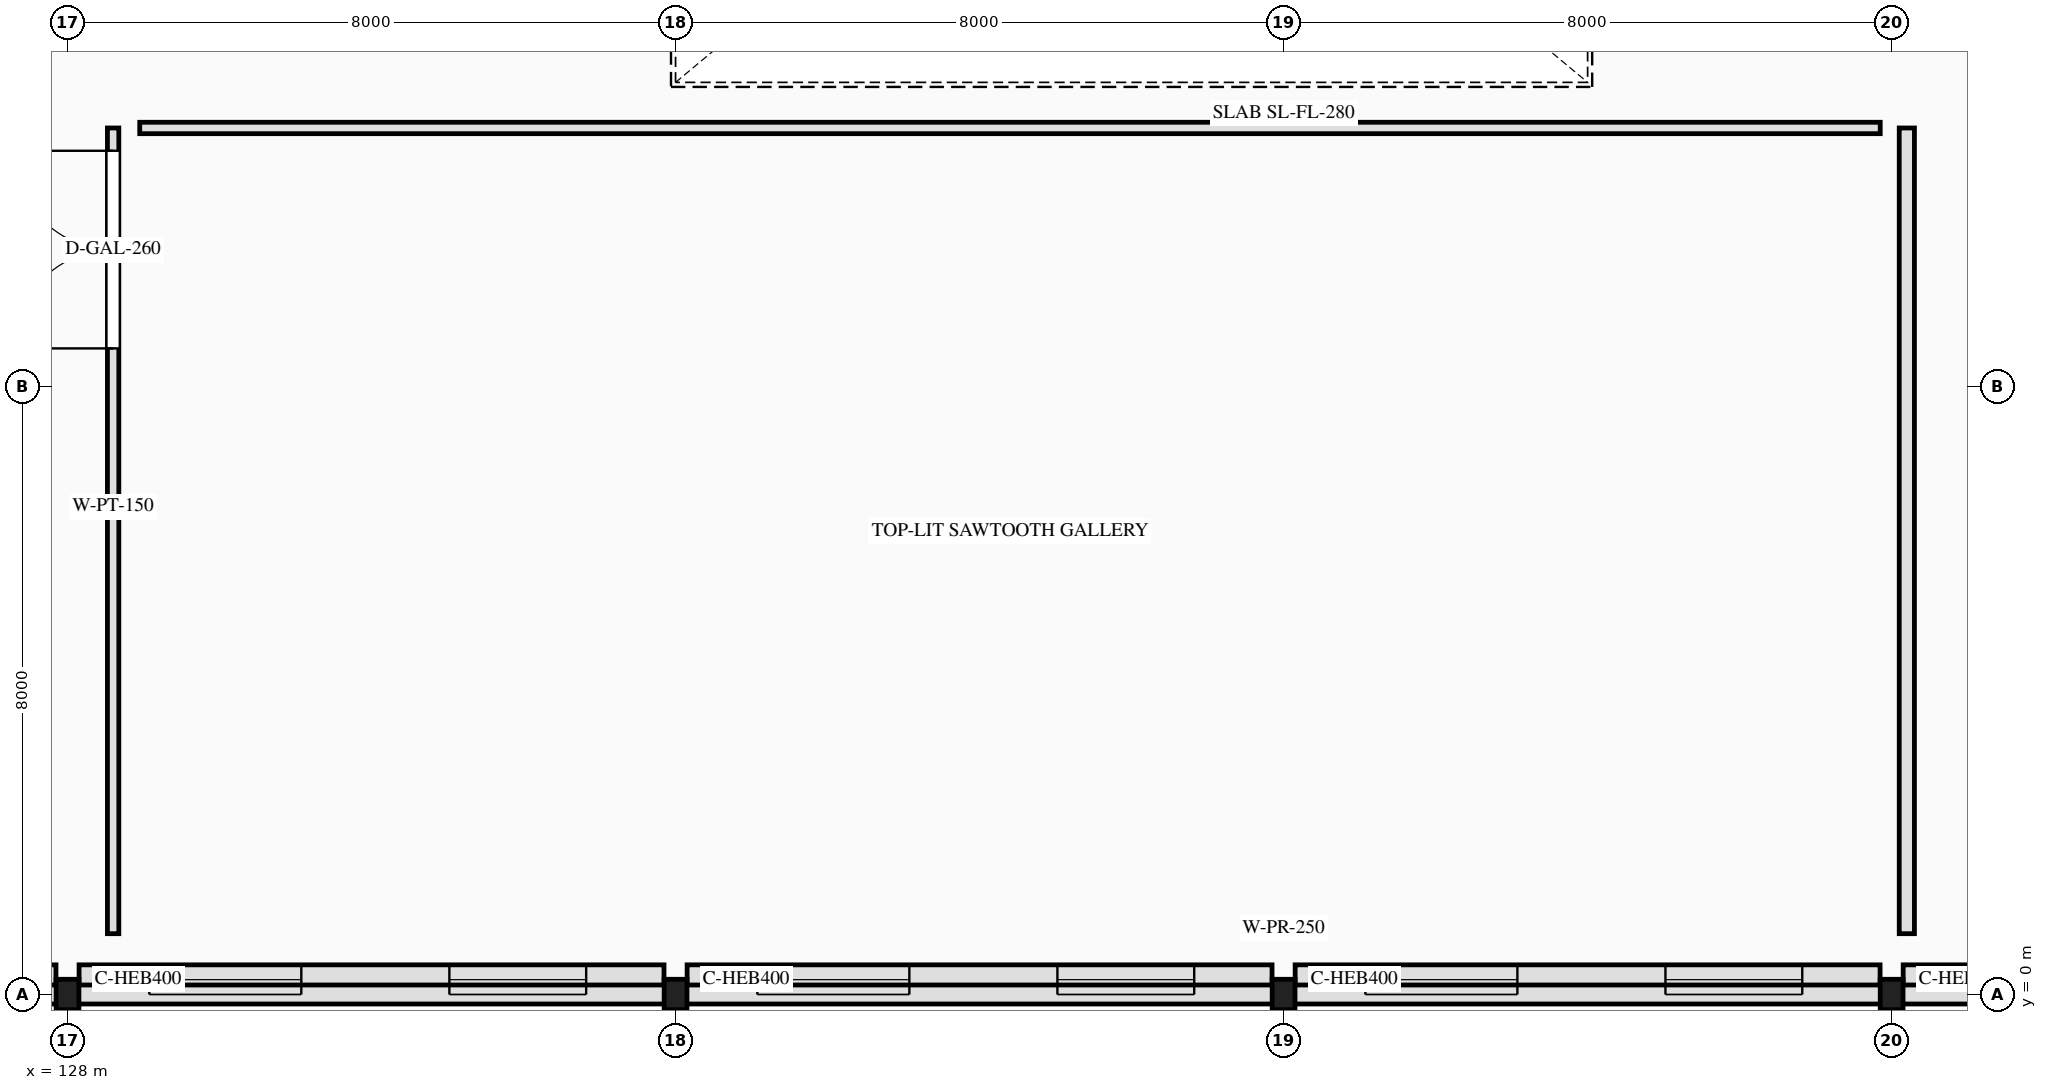
"""IFC4 building model, lengths in metres.
Left out: names, types, materials, properties, quantities, classifications, styles, units other than length and angle.
Written with IfcOpenShell. Run it as: python <this file> out.ifc"""

import sys

from ifc_helpers import new_model, si_unit, direction, frame, frame_2d, origin, origin_2d, place, context, subcontext, project, spatial, rectangle, i_section, extrude, element, fill, save


model = new_model("IFC4")
c1 = context("Model", 3, precision=1e-05, world=origin(), true_north=direction((0.0, 1.0)))
c2 = subcontext(c1, "Body", "Model", "MODEL_VIEW")
j1 = project(units=[si_unit("LENGTHUNIT", "METRE"), si_unit("PLANEANGLEUNIT", "RADIAN")], contexts=[c1])
p1 = place(None, origin())
s1 = spatial("IfcSite", under=j1, at=p1, CompositionType="ELEMENT")
p2 = place(p1, origin())
s2 = spatial("IfcBuilding", under=s1, at=p2, CompositionType="ELEMENT")
p3 = place(p2, frame((0.0, 0.0, 26.0)))
s3 = spatial("IfcBuildingStorey", under=s2, at=p3, CompositionType="ELEMENT", Elevation=26.0)
for number, where, z_axis, x_axis in (
    (1, (128.0, 0.0, 0.0), (0.0, 0.0, 1.0), (1.0, 0.0, 0.0)),
    (2, (136.0, 0.0, 0.0), (0.0, 0.0, 1.0), (1.0, 0.0, 0.0)),
    (3, (144.0, 0.0, 0.0), (0.0, 0.0, 1.0), (1.0, 0.0, 0.0)),
    (4, (152.0, 0.0, 0.0), (0.0, 0.0, 1.0), (1.0, 0.0, 0.0)),
):
    element("IfcColumn", number, at=place(p3, frame(where, z_axis=z_axis, x_axis=x_axis)), inside=s3, PredefinedType="COLUMN", context=c2, shape_type="SweptSolid", body=[
        extrude(i_section(OverallWidth=0.3, OverallDepth=0.4, WebThickness=0.013, FlangeThickness=0.024, FilletRadius=0.027, at=origin_2d()), origin(), (0.0, 0.0, 1.0), 8.0),
    ])
p4 = place(p3, frame((127.848, 0.195, 0.0), z_axis=(0.0, 0.0, 1.0), x_axis=(-1.0, 0.0, 0.0)))
e5 = element("IfcWall", 5, at=p4, inside=s3, PredefinedType="SOLIDWALL", context=c2, shape_type="SweptSolid", body=[
    extrude(rectangle(XDim=7.696, YDim=0.39, at=frame_2d((3.848, 0.0))), origin(), (0.0, 0.0, 1.0), 7.495),
])
p5 = place(p4, frame((1.024, 0.0, 0.85)))
e6 = element("IfcOpeningElement", 6, at=p5, cuts=e5, PredefinedType="OPENING", context=c2, shape_type="SweptSolid", body=[
    extrude(rectangle(XDim=1.8, YDim=4.2, at=frame_2d((0.9, 2.1))), frame((0.0, 0.205, 0.0), z_axis=(0.0, -1.0, 0.0), x_axis=(1.0, 0.0, 0.0)), (0.0, 0.0, 1.0), 0.41),
])
p6 = place(p4, frame((4.772, 0.0, 0.85)))
e7 = element("IfcOpeningElement", 7, at=p6, cuts=e5, PredefinedType="OPENING", context=c2, shape_type="SweptSolid", body=[
    extrude(rectangle(XDim=2.0, YDim=4.6, at=frame_2d((1.0, 2.3))), frame((0.0, 0.205, 0.0), z_axis=(0.0, -1.0, 0.0), x_axis=(1.0, 0.0, 0.0)), (0.0, 0.0, 1.0), 0.41),
])
p7 = place(p3, frame((135.848, 0.195, 0.0), z_axis=(0.0, 0.0, 1.0), x_axis=(-1.0, 0.0, 0.0)))
e8 = element("IfcWall", 8, at=p7, inside=s3, PredefinedType="SOLIDWALL", context=c2, shape_type="SweptSolid", body=[
    extrude(rectangle(XDim=7.696, YDim=0.39, at=frame_2d((3.848, 0.0))), origin(), (0.0, 0.0, 1.0), 7.495),
])
p8 = place(p7, frame((1.024, 0.0, 0.85)))
e9 = element("IfcOpeningElement", 9, at=p8, cuts=e8, PredefinedType="OPENING", context=c2, shape_type="SweptSolid", body=[
    extrude(rectangle(XDim=1.8, YDim=4.2, at=frame_2d((0.9, 2.1))), frame((0.0, 0.205, 0.0), z_axis=(0.0, -1.0, 0.0), x_axis=(1.0, 0.0, 0.0)), (0.0, 0.0, 1.0), 0.41),
])
p9 = place(p7, frame((4.772, 0.0, 0.85)))
e10 = element("IfcOpeningElement", 10, at=p9, cuts=e8, PredefinedType="OPENING", context=c2, shape_type="SweptSolid", body=[
    extrude(rectangle(XDim=2.0, YDim=4.6, at=frame_2d((1.0, 2.3))), frame((0.0, 0.205, 0.0), z_axis=(0.0, -1.0, 0.0), x_axis=(1.0, 0.0, 0.0)), (0.0, 0.0, 1.0), 0.41),
])
p10 = place(p3, frame((143.848, 0.195, 0.0), z_axis=(0.0, 0.0, 1.0), x_axis=(-1.0, 0.0, 0.0)))
e11 = element("IfcWall", 11, at=p10, inside=s3, PredefinedType="SOLIDWALL", context=c2, shape_type="SweptSolid", body=[
    extrude(rectangle(XDim=7.696, YDim=0.39, at=frame_2d((3.848, 0.0))), origin(), (0.0, 0.0, 1.0), 7.495),
])
p11 = place(p10, frame((1.024, 0.0, 0.85)))
e12 = element("IfcOpeningElement", 12, at=p11, cuts=e11, PredefinedType="OPENING", context=c2, shape_type="SweptSolid", body=[
    extrude(rectangle(XDim=1.8, YDim=4.2, at=frame_2d((0.9, 2.1))), frame((0.0, 0.205, 0.0), z_axis=(0.0, -1.0, 0.0), x_axis=(1.0, 0.0, 0.0)), (0.0, 0.0, 1.0), 0.41),
])
p12 = place(p10, frame((4.772, 0.0, 0.85)))
e13 = element("IfcOpeningElement", 13, at=p12, cuts=e11, PredefinedType="OPENING", context=c2, shape_type="SweptSolid", body=[
    extrude(rectangle(XDim=2.0, YDim=4.6, at=frame_2d((1.0, 2.3))), frame((0.0, 0.205, 0.0), z_axis=(0.0, -1.0, 0.0), x_axis=(1.0, 0.0, 0.0)), (0.0, 0.0, 1.0), 0.41),
])
p13 = place(p3, frame((151.848, 0.195, 0.0), z_axis=(0.0, 0.0, 1.0), x_axis=(-1.0, 0.0, 0.0)))
e14 = element("IfcWall", 14, at=p13, inside=s3, PredefinedType="SOLIDWALL", context=c2, shape_type="SweptSolid", body=[
    extrude(rectangle(XDim=7.696, YDim=0.39, at=frame_2d((3.848, 0.0))), origin(), (0.0, 0.0, 1.0), 7.495),
])
p14 = place(p13, frame((1.024, 0.0, 0.85)))
e15 = element("IfcOpeningElement", 15, at=p14, cuts=e14, PredefinedType="OPENING", context=c2, shape_type="SweptSolid", body=[
    extrude(rectangle(XDim=1.8, YDim=4.2, at=frame_2d((0.9, 2.1))), frame((0.0, 0.205, 0.0), z_axis=(0.0, -1.0, 0.0), x_axis=(1.0, 0.0, 0.0)), (0.0, 0.0, 1.0), 0.41),
])
p15 = place(p13, frame((4.772, 0.0, 0.85)))
e16 = element("IfcOpeningElement", 16, at=p15, cuts=e14, PredefinedType="OPENING", context=c2, shape_type="SweptSolid", body=[
    extrude(rectangle(XDim=2.0, YDim=4.6, at=frame_2d((1.0, 2.3))), frame((0.0, 0.205, 0.0), z_axis=(0.0, -1.0, 0.0), x_axis=(1.0, 0.0, 0.0)), (0.0, 0.0, 1.0), 0.41),
])
p16 = place(p3, frame((159.848, 0.195, 0.0), z_axis=(0.0, 0.0, 1.0), x_axis=(-1.0, 0.0, 0.0)))
e17 = element("IfcWall", 17, at=p16, inside=s3, PredefinedType="SOLIDWALL", context=c2, shape_type="SweptSolid", body=[
    extrude(rectangle(XDim=7.696, YDim=0.39, at=frame_2d((3.848, 0.0))), origin(), (0.0, 0.0, 1.0), 7.495),
])
p17 = place(p16, frame((1.024, 0.0, 0.85)))
e18 = element("IfcOpeningElement", 18, at=p17, cuts=e17, PredefinedType="OPENING", context=c2, shape_type="SweptSolid", body=[
    extrude(rectangle(XDim=1.8, YDim=4.2, at=frame_2d((0.9, 2.1))), frame((0.0, 0.205, 0.0), z_axis=(0.0, -1.0, 0.0), x_axis=(1.0, 0.0, 0.0)), (0.0, 0.0, 1.0), 0.41),
])
p18 = place(p16, frame((4.772, 0.0, 0.85)))
e19 = element("IfcOpeningElement", 19, at=p18, cuts=e17, PredefinedType="OPENING", context=c2, shape_type="SweptSolid", body=[
    extrude(rectangle(XDim=2.0, YDim=4.6, at=frame_2d((1.0, 2.3))), frame((0.0, 0.205, 0.0), z_axis=(0.0, -1.0, 0.0), x_axis=(1.0, 0.0, 0.0)), (0.0, 0.0, 1.0), 0.41),
])
p19 = place(p3, frame((120.2, 0.0, 8.0), z_axis=(0.0, 0.0, 1.0), x_axis=(1.0, 0.0, 0.0)))
e20 = element("IfcWall", 20, at=p19, inside=s3, PredefinedType="PARAPET", context=c2, shape_type="SweptSolid", body=[
    extrude(rectangle(XDim=47.6, YDim=0.25, at=frame_2d((23.8, 0.0))), origin(), (0.0, 0.0, 1.0), 0.55),
])
p20 = place(p3, frame((128.6, 0.8, 0.0), z_axis=(0.0, 0.0, 1.0), x_axis=(0.0, 1.0, 0.0)))
e21 = element("IfcWall", 21, at=p20, inside=s3, PredefinedType="PARTITIONING", context=c2, shape_type="SweptSolid", body=[
    extrude(rectangle(XDim=10.6, YDim=0.15, at=frame_2d((5.3, 0.0))), origin(), (0.0, 0.0, 1.0), 7.82),
])
p21 = place(p20, frame((7.7, 0.0, 0.0)))
e22 = element("IfcOpeningElement", 22, at=p21, cuts=e21, PredefinedType="OPENING", context=c2, shape_type="SweptSolid", body=[
    extrude(rectangle(XDim=2.6, YDim=2.9, at=frame_2d((1.3, 1.45))), frame((0.0, 0.085, 0.0), z_axis=(0.0, -1.0, 0.0), x_axis=(1.0, 0.0, 0.0)), (0.0, 0.0, 1.0), 0.17),
])
p22 = place(p3, frame((152.2, 0.8, 0.0), z_axis=(0.0, 0.0, 1.0), x_axis=(0.0, 1.0, 0.0)))
e23 = element("IfcWall", 23, at=p22, inside=s3, PredefinedType="PARTITIONING", context=c2, shape_type="SweptSolid", body=[
    extrude(rectangle(XDim=10.6, YDim=0.2, at=frame_2d((5.3, 0.0))), origin(), (0.0, 0.0, 1.0), 7.82),
])
p23 = place(p3, frame((128.95, 11.4, 0.0), z_axis=(0.0, 0.0, 1.0), x_axis=(1.0, 0.0, 0.0)))
e24 = element("IfcWall", 24, at=p23, inside=s3, PredefinedType="PARTITIONING", context=c2, shape_type="SweptSolid", body=[
    extrude(rectangle(XDim=22.9, YDim=0.15, at=frame_2d((11.45, 0.0))), origin(), (0.0, 0.0, 1.0), 7.82),
])
p24 = place(p8, origin())
e25 = element("IfcWindow", 25, at=p24, inside=s3, PartitioningType="DOUBLE_PANEL_VERTICAL", PredefinedType="WINDOW", context=c2, shape_type="SweptSolid", body=[
    extrude(rectangle(XDim=1.8, YDim=4.2, at=frame_2d((0.9, 2.1))), frame((0.0, 0.03, 0.0), z_axis=(0.0, -1.0, 0.0), x_axis=(1.0, 0.0, 0.0)), (0.0, 0.0, 1.0), 0.06),
])
fill(e9, e25)
p25 = place(p9, origin())
e26 = element("IfcWindow", 26, at=p25, inside=s3, PartitioningType="TRIPLE_PANEL_VERTICAL", PredefinedType="WINDOW", context=c2, shape_type="SweptSolid", body=[
    extrude(rectangle(XDim=2.0, YDim=4.6, at=frame_2d((1.0, 2.3))), frame((0.0, 0.03, 0.0), z_axis=(0.0, -1.0, 0.0), x_axis=(1.0, 0.0, 0.0)), (0.0, 0.0, 1.0), 0.06),
])
fill(e10, e26)
p26 = place(p11, origin())
e27 = element("IfcWindow", 27, at=p26, inside=s3, PartitioningType="DOUBLE_PANEL_VERTICAL", PredefinedType="WINDOW", context=c2, shape_type="SweptSolid", body=[
    extrude(rectangle(XDim=1.8, YDim=4.2, at=frame_2d((0.9, 2.1))), frame((0.0, 0.03, 0.0), z_axis=(0.0, -1.0, 0.0), x_axis=(1.0, 0.0, 0.0)), (0.0, 0.0, 1.0), 0.06),
])
fill(e12, e27)
p27 = place(p12, origin())
e28 = element("IfcWindow", 28, at=p27, inside=s3, PartitioningType="TRIPLE_PANEL_VERTICAL", PredefinedType="WINDOW", context=c2, shape_type="SweptSolid", body=[
    extrude(rectangle(XDim=2.0, YDim=4.6, at=frame_2d((1.0, 2.3))), frame((0.0, 0.03, 0.0), z_axis=(0.0, -1.0, 0.0), x_axis=(1.0, 0.0, 0.0)), (0.0, 0.0, 1.0), 0.06),
])
fill(e13, e28)
p28 = place(p14, origin())
e29 = element("IfcWindow", 29, at=p28, inside=s3, PartitioningType="DOUBLE_PANEL_VERTICAL", PredefinedType="WINDOW", context=c2, shape_type="SweptSolid", body=[
    extrude(rectangle(XDim=1.8, YDim=4.2, at=frame_2d((0.9, 2.1))), frame((0.0, 0.03, 0.0), z_axis=(0.0, -1.0, 0.0), x_axis=(1.0, 0.0, 0.0)), (0.0, 0.0, 1.0), 0.06),
])
fill(e15, e29)
p29 = place(p15, origin())
e30 = element("IfcWindow", 30, at=p29, inside=s3, PartitioningType="TRIPLE_PANEL_VERTICAL", PredefinedType="WINDOW", context=c2, shape_type="SweptSolid", body=[
    extrude(rectangle(XDim=2.0, YDim=4.6, at=frame_2d((1.0, 2.3))), frame((0.0, 0.03, 0.0), z_axis=(0.0, -1.0, 0.0), x_axis=(1.0, 0.0, 0.0)), (0.0, 0.0, 1.0), 0.06),
])
fill(e16, e30)
p30 = place(p21, origin())
e31 = element("IfcDoor", 31, at=p30, inside=s3, OperationType="DOUBLE_DOOR_DOUBLE_SWING", PredefinedType="DOOR", context=c2, shape_type="SweptSolid", body=[
    extrude(rectangle(XDim=2.6, YDim=2.9, at=frame_2d((1.3, 1.45))), frame((0.0, 0.025, 0.0), z_axis=(0.0, -1.0, 0.0), x_axis=(1.0, 0.0, 0.0)), (0.0, 0.0, 1.0), 0.05),
])
fill(e22, e31)
save(model, sys.argv[1])
